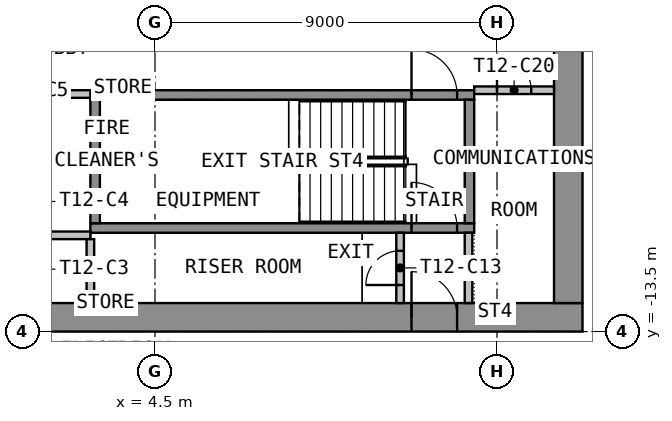
"""IFC4 building model, lengths in metres.
Left out: names, types, materials, properties, quantities, classifications, styles, units other than length and angle.
Written with IfcOpenShell. Run it as: python <this file> out.ifc"""

import sys

from ifc_helpers import new_model, si_unit, direction, frame, frame_2d, origin, place, context, subcontext, project, spatial, rectangle, extrude, element, fill, save


model = new_model("IFC4")
c1 = context("Model", 3, precision=1e-05, world=origin(), true_north=direction((0.0, 1.0)))
c2 = subcontext(c1, "Body", "Model", "MODEL_VIEW")
j1 = project(units=[si_unit("LENGTHUNIT", "METRE"), si_unit("PLANEANGLEUNIT", "RADIAN")], contexts=[c1])
p1 = place(None, origin())
s1 = spatial("IfcSite", under=j1, at=p1, CompositionType="ELEMENT")
p2 = place(p1, origin())
s2 = spatial("IfcBuilding", under=s1, at=p2, CompositionType="ELEMENT")
p3 = place(p2, frame((0.0, 0.0, 167.7)))
s3 = spatial("IfcBuildingStorey", under=s2, at=p3, CompositionType="ELEMENT", Elevation=167.7)
p4 = place(p3, frame((-15.75, -13.125, 0.0), z_axis=(0.0, 0.0, 1.0), x_axis=(1.0, 0.0, 0.0)))
e1 = element("IfcWall", 1, at=p4, inside=s3, PredefinedType="SHEAR", context=c2, shape_type="SweptSolid", body=[
    extrude(rectangle(XDim=31.5, YDim=0.75, at=frame_2d((15.75, 0.0))), origin(), (0.0, 0.0, 1.0), 3.575),
])
p5 = place(p4, frame((14.55, 0.0, 0.0)))
e2 = element("IfcOpeningElement", 2, at=p5, cuts=e1, PredefinedType="OPENING", context=c2, shape_type="SweptSolid", body=[
    extrude(rectangle(XDim=2.4, YDim=2.1, at=frame_2d((1.2, 1.05))), frame((0.0, 0.385, 0.0), z_axis=(0.0, -1.0, 0.0), x_axis=(1.0, 0.0, 0.0)), (0.0, 0.0, 1.0), 0.77),
])
p6 = place(p4, frame((3.3, 0.0, 0.0)))
e3 = element("IfcOpeningElement", 3, at=p6, cuts=e1, PredefinedType="OPENING", context=c2, shape_type="SweptSolid", body=[
    extrude(rectangle(XDim=1.2, YDim=2.1, at=frame_2d((0.6, 1.05))), frame((0.0, 0.385, 0.0), z_axis=(0.0, -1.0, 0.0), x_axis=(1.0, 0.0, 0.0)), (0.0, 0.0, 1.0), 0.77),
])
p7 = place(p4, frame((27.0, 0.0, 0.0)))
e4 = element("IfcOpeningElement", 4, at=p7, cuts=e1, PredefinedType="OPENING", context=c2, shape_type="SweptSolid", body=[
    extrude(rectangle(XDim=1.2, YDim=2.1, at=frame_2d((0.6, 1.05))), frame((0.0, 0.385, 0.0), z_axis=(0.0, -1.0, 0.0), x_axis=(1.0, 0.0, 0.0)), (0.0, 0.0, 1.0), 0.77),
])
p8 = place(p3, frame((15.375, -12.75, 0.0), z_axis=(0.0, 0.0, 1.0), x_axis=(0.0, 1.0, 0.0)))
e5 = element("IfcWall", 5, at=p8, inside=s3, PredefinedType="SHEAR", context=c2, shape_type="SweptSolid", body=[
    extrude(rectangle(XDim=25.5, YDim=0.75, at=frame_2d((12.75, 0.0))), origin(), (0.0, 0.0, 1.0), 3.575),
])
p9 = place(p8, frame((11.55, 0.0, 0.0)))
e6 = element("IfcOpeningElement", 6, at=p9, cuts=e5, PredefinedType="OPENING", context=c2, shape_type="SweptSolid", body=[
    extrude(rectangle(XDim=2.4, YDim=2.1, at=frame_2d((1.2, 1.05))), frame((0.0, 0.385, 0.0), z_axis=(0.0, -1.0, 0.0), x_axis=(1.0, 0.0, 0.0)), (0.0, 0.0, 1.0), 0.77),
])
p10 = place(p3, frame((2.8, -10.775, 0.0), z_axis=(0.0, 0.0, 1.0), x_axis=(1.0, 0.0, 0.0)))
e7 = element("IfcWall", 7, at=p10, inside=s3, PredefinedType="SHEAR", context=c2, shape_type="SweptSolid", body=[
    extrude(rectangle(XDim=10.1, YDim=0.25, at=frame_2d((5.05, 0.0))), origin(), (0.0, 0.0, 1.0), 3.575),
])
p11 = place(p10, frame((8.45, 0.0, 0.0)))
e8 = element("IfcOpeningElement", 8, at=p11, cuts=e7, PredefinedType="OPENING", context=c2, shape_type="SweptSolid", body=[
    extrude(rectangle(XDim=1.2, YDim=2.1, at=frame_2d((0.6, 1.05))), frame((0.0, 0.135, 0.0), z_axis=(0.0, -1.0, 0.0), x_axis=(1.0, 0.0, 0.0)), (0.0, 0.0, 1.0), 0.27),
])
p12 = place(p3, frame((2.8, -7.275, 0.0), z_axis=(0.0, 0.0, 1.0), x_axis=(1.0, 0.0, 0.0)))
e9 = element("IfcWall", 9, at=p12, inside=s3, PredefinedType="SHEAR", context=c2, shape_type="SweptSolid", body=[
    extrude(rectangle(XDim=10.1, YDim=0.25, at=frame_2d((5.05, 0.0))), origin(), (0.0, 0.0, 1.0), 3.575),
])
p13 = place(p12, frame((8.45, 0.0, 0.0)))
e10 = element("IfcOpeningElement", 10, at=p13, cuts=e9, PredefinedType="OPENING", context=c2, shape_type="SweptSolid", body=[
    extrude(rectangle(XDim=1.2, YDim=2.1, at=frame_2d((0.6, 1.05))), frame((0.0, 0.135, 0.0), z_axis=(0.0, -1.0, 0.0), x_axis=(1.0, 0.0, 0.0)), (0.0, 0.0, 1.0), 0.27),
])
for number, where, z_axis, x_axis in (
    (11, (2.925, -10.65, 0.0), (0.0, 0.0, 1.0), (0.0, 1.0, 0.0)),
    (12, (12.775, -10.65, 0.0), (0.0, 0.0, 1.0), (0.0, 1.0, 0.0)),
):
    element("IfcWall", number, at=place(p3, frame(where, z_axis=z_axis, x_axis=x_axis)), inside=s3, PredefinedType="SHEAR", context=c2, shape_type="SweptSolid", body=[
        extrude(rectangle(XDim=3.25, YDim=0.25, at=frame_2d((1.625, 0.0))), origin(), (0.0, 0.0, 1.0), 3.575),
    ])
for number, where, z_axis, x_axis in (
    (13, (1.4, -7.25, 0.0), (0.0, 0.0, 1.0), (1.0, 0.0, 0.0)),
    (14, (1.4, -9.186, 0.0), (0.0, 0.0, 1.0), (1.0, 0.0, 0.0)),
    (15, (1.4, -10.968, 0.0), (0.0, 0.0, 1.0), (1.0, 0.0, 0.0)),
):
    element("IfcWall", number, at=place(p3, frame(where, z_axis=z_axis, x_axis=x_axis)), inside=s3, PredefinedType="PARTITIONING", context=c2, shape_type="SweptSolid", body=[
        extrude(rectangle(XDim=1.4, YDim=0.2, at=frame_2d((0.7, 0.0))), origin(), (0.0, 0.0, 1.0), 3.575),
    ])
p14 = place(p3, frame((12.75, -12.75, 0.0), z_axis=(0.0, 0.0, 1.0), x_axis=(0.0, 1.0, 0.0)))
e16 = element("IfcWall", 16, at=p14, inside=s3, PredefinedType="PARTITIONING", context=c2, shape_type="SweptSolid", body=[
    extrude(rectangle(XDim=1.85, YDim=0.2, at=frame_2d((0.925, 0.0))), origin(), (0.0, 0.0, 1.0), 3.575),
])
p15 = place(p3, frame((10.95, -12.75, 0.0), z_axis=(0.0, 0.0, 1.0), x_axis=(0.0, 1.0, 0.0)))
e17 = element("IfcWall", 17, at=p15, inside=s3, PredefinedType="PARTITIONING", context=c2, shape_type="SweptSolid", body=[
    extrude(rectangle(XDim=1.85, YDim=0.2, at=frame_2d((0.925, 0.0))), origin(), (0.0, 0.0, 1.0), 3.575),
])
p16 = place(p15, frame((0.475, 0.0, 0.0)))
e18 = element("IfcOpeningElement", 18, at=p16, cuts=e17, PredefinedType="OPENING", context=c2, shape_type="SweptSolid", body=[
    extrude(rectangle(XDim=0.9, YDim=2.1, at=frame_2d((0.45, 1.05))), frame((0.0, 0.11, 0.0), z_axis=(0.0, -1.0, 0.0), x_axis=(1.0, 0.0, 0.0)), (0.0, 0.0, 1.0), 0.22),
])
p17 = place(p3, frame((12.9, -7.15, 0.0), z_axis=(0.0, 0.0, 1.0), x_axis=(1.0, 0.0, 0.0)))
e19 = element("IfcWall", 19, at=p17, inside=s3, PredefinedType="PARTITIONING", context=c2, shape_type="SweptSolid", body=[
    extrude(rectangle(XDim=2.1, YDim=0.2, at=frame_2d((1.05, 0.0))), origin(), (0.0, 0.0, 1.0), 3.575),
])
p18 = place(p17, frame((0.6, 0.0, 0.0)))
e20 = element("IfcOpeningElement", 20, at=p18, cuts=e19, PredefinedType="OPENING", context=c2, shape_type="SweptSolid", body=[
    extrude(rectangle(XDim=0.9, YDim=2.1, at=frame_2d((0.45, 1.05))), frame((0.0, 0.11, 0.0), z_axis=(0.0, -1.0, 0.0), x_axis=(1.0, 0.0, 0.0)), (0.0, 0.0, 1.0), 0.22),
])
p19 = place(p3, frame((2.8, -12.749, 0.0), z_axis=(0.0, 0.0, 1.0), x_axis=(0.0, 1.0, 0.0)))
e21 = element("IfcWall", 21, at=p19, inside=s3, PredefinedType="PARTITIONING", context=c2, shape_type="SweptSolid", body=[
    extrude(rectangle(XDim=1.68, YDim=0.2, at=frame_2d((0.84, 0.0))), origin(), (0.0, 0.0, 1.0), 3.575),
])
p20 = place(p7, origin())
e22 = element("IfcDoor", 22, at=p20, inside=s3, OperationType="SINGLE_SWING_RIGHT", PredefinedType="DOOR", context=c2, shape_type="SweptSolid", body=[
    extrude(rectangle(XDim=1.2, YDim=2.1, at=frame_2d((0.6, 1.05))), frame((0.0, 0.025, 0.0), z_axis=(0.0, -1.0, 0.0), x_axis=(1.0, 0.0, 0.0)), (0.0, 0.0, 1.0), 0.05),
])
fill(e4, e22)
p21 = place(p13, origin())
e23 = element("IfcDoor", 23, at=p21, inside=s3, OperationType="SINGLE_SWING_LEFT", PredefinedType="DOOR", context=c2, shape_type="SweptSolid", body=[
    extrude(rectangle(XDim=1.2, YDim=2.1, at=frame_2d((0.6, 1.05))), frame((0.0, 0.025, 0.0), z_axis=(0.0, -1.0, 0.0), x_axis=(1.0, 0.0, 0.0)), (0.0, 0.0, 1.0), 0.05),
])
fill(e10, e23)
p22 = place(p11, origin())
e24 = element("IfcDoor", 24, at=p22, inside=s3, OperationType="SINGLE_SWING_RIGHT", PredefinedType="DOOR", context=c2, shape_type="SweptSolid", body=[
    extrude(rectangle(XDim=1.2, YDim=2.1, at=frame_2d((0.6, 1.05))), frame((0.0, 0.025, 0.0), z_axis=(0.0, -1.0, 0.0), x_axis=(1.0, 0.0, 0.0)), (0.0, 0.0, 1.0), 0.05),
])
fill(e8, e24)
p23 = place(p16, origin())
e25 = element("IfcDoor", 25, at=p23, inside=s3, OperationType="SINGLE_SWING_LEFT", PredefinedType="DOOR", context=c2, shape_type="SweptSolid", body=[
    extrude(rectangle(XDim=0.9, YDim=2.1, at=frame_2d((0.45, 1.05))), frame((0.0, 0.025, 0.0), z_axis=(0.0, -1.0, 0.0), x_axis=(1.0, 0.0, 0.0)), (0.0, 0.0, 1.0), 0.05),
])
fill(e18, e25)
p24 = place(p18, origin())
e26 = element("IfcDoor", 26, at=p24, inside=s3, OperationType="SINGLE_SWING_LEFT", PredefinedType="DOOR", context=c2, shape_type="SweptSolid", body=[
    extrude(rectangle(XDim=0.9, YDim=2.1, at=frame_2d((0.45, 1.05))), frame((0.0, 0.025, 0.0), z_axis=(0.0, -1.0, 0.0), x_axis=(1.0, 0.0, 0.0)), (0.0, 0.0, 1.0), 0.05),
])
fill(e20, e26)
save(model, sys.argv[1])
